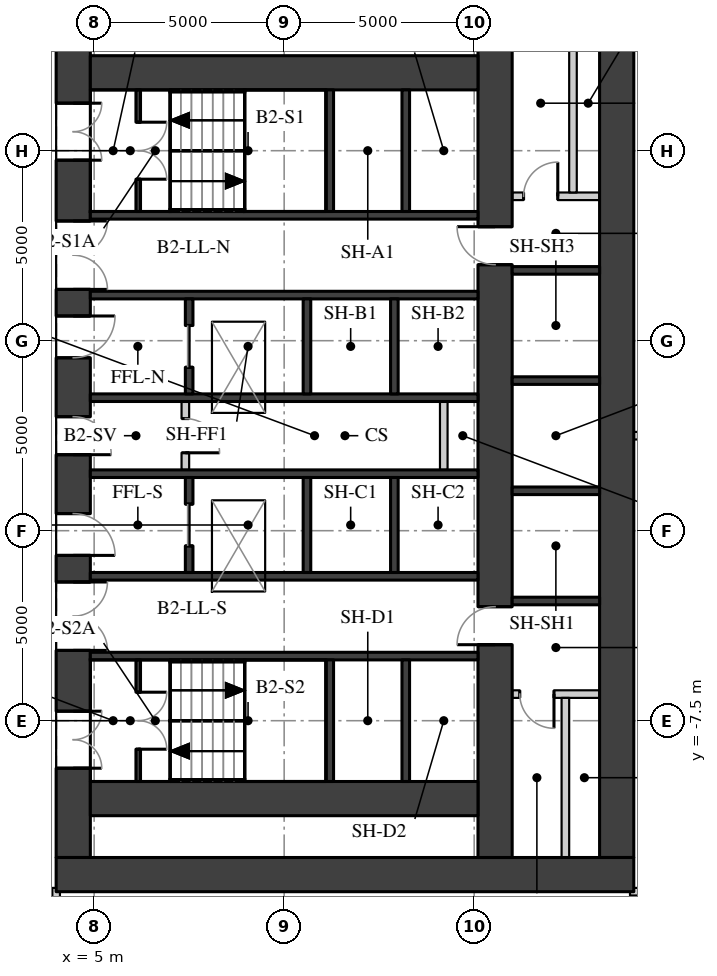
"""IFC4 building model, lengths in metres.
Left out: names, types, materials, properties, quantities, classifications, styles, units other than length and angle.
Written with IfcOpenShell. Run it as: python <this file> out.ifc"""

import sys

from ifc_helpers import new_model, si_unit, direction, frame, frame_2d, origin, place, context, subcontext, project, spatial, rectangle, extrude, element, fill, save


model = new_model("IFC4")
c1 = context("Model", 3, precision=1e-05, world=origin(), true_north=direction((0.0, 1.0)))
c2 = subcontext(c1, "Body", "Model", "MODEL_VIEW")
j1 = project(units=[si_unit("LENGTHUNIT", "METRE"), si_unit("PLANEANGLEUNIT", "RADIAN")], contexts=[c1])
p1 = place(None, origin())
s1 = spatial("IfcSite", under=j1, at=p1, CompositionType="ELEMENT")
p2 = place(p1, origin())
s2 = spatial("IfcBuilding", under=s1, at=p2, CompositionType="ELEMENT")
p3 = place(p2, frame((0.0, 0.0, -10.4)))
s3 = spatial("IfcBuildingStorey", under=s2, at=p3, CompositionType="ELEMENT", Elevation=-10.4)
p4 = place(p3, frame((4.45, -11.1, 0.0), z_axis=(0.0, 0.0, 1.0), x_axis=(0.0, 1.0, 0.0)))
e1 = element("IfcWall", 1, at=p4, inside=s3, PredefinedType="SHEAR", context=c2, shape_type="SweptSolid", body=[
    extrude(rectangle(XDim=22.2, YDim=0.9, at=frame_2d((11.1, 0.0))), origin(), (0.0, 0.0, 1.0), 4.75),
])
p5 = place(p4, frame((2.35, 0.0, 0.0)))
e2 = element("IfcOpeningElement", 2, at=p5, cuts=e1, PredefinedType="OPENING", context=c2, shape_type="SweptSolid", body=[
    extrude(rectangle(XDim=1.5, YDim=2.1, at=frame_2d((0.75, 1.05))), frame((0.0, 0.46, 0.0), z_axis=(0.0, -1.0, 0.0), x_axis=(1.0, 0.0, 0.0)), (0.0, 0.0, 1.0), 0.92),
])
p6 = place(p4, frame((5.45, 0.0, 0.0)))
e3 = element("IfcOpeningElement", 3, at=p6, cuts=e1, PredefinedType="OPENING", context=c2, shape_type="SweptSolid", body=[
    extrude(rectangle(XDim=1.8, YDim=2.1, at=frame_2d((0.9, 1.05))), frame((0.0, 0.46, 0.0), z_axis=(0.0, -1.0, 0.0), x_axis=(1.0, 0.0, 0.0)), (0.0, 0.0, 1.0), 0.92),
])
p7 = place(p4, frame((7.95, 0.0, 0.0)))
e4 = element("IfcOpeningElement", 4, at=p7, cuts=e1, PredefinedType="OPENING", context=c2, shape_type="SweptSolid", body=[
    extrude(rectangle(XDim=1.1, YDim=2.1, at=frame_2d((0.55, 1.05))), frame((0.0, 0.46, 0.0), z_axis=(0.0, -1.0, 0.0), x_axis=(1.0, 0.0, 0.0)), (0.0, 0.0, 1.0), 0.92),
])
p8 = place(p4, frame((10.6, 0.0, 0.0)))
e5 = element("IfcOpeningElement", 5, at=p8, cuts=e1, PredefinedType="OPENING", context=c2, shape_type="SweptSolid", body=[
    extrude(rectangle(XDim=1.0, YDim=2.1, at=frame_2d((0.5, 1.05))), frame((0.0, 0.46, 0.0), z_axis=(0.0, -1.0, 0.0), x_axis=(1.0, 0.0, 0.0)), (0.0, 0.0, 1.0), 0.92),
])
p9 = place(p4, frame((13.15, 0.0, 0.0)))
e6 = element("IfcOpeningElement", 6, at=p9, cuts=e1, PredefinedType="OPENING", context=c2, shape_type="SweptSolid", body=[
    extrude(rectangle(XDim=1.1, YDim=2.1, at=frame_2d((0.55, 1.05))), frame((0.0, 0.46, 0.0), z_axis=(0.0, -1.0, 0.0), x_axis=(1.0, 0.0, 0.0)), (0.0, 0.0, 1.0), 0.92),
])
p10 = place(p4, frame((14.95, 0.0, 0.0)))
e7 = element("IfcOpeningElement", 7, at=p10, cuts=e1, PredefinedType="OPENING", context=c2, shape_type="SweptSolid", body=[
    extrude(rectangle(XDim=1.8, YDim=2.1, at=frame_2d((0.9, 1.05))), frame((0.0, 0.46, 0.0), z_axis=(0.0, -1.0, 0.0), x_axis=(1.0, 0.0, 0.0)), (0.0, 0.0, 1.0), 0.92),
])
p11 = place(p4, frame((18.35, 0.0, 0.0)))
e8 = element("IfcOpeningElement", 8, at=p11, cuts=e1, PredefinedType="OPENING", context=c2, shape_type="SweptSolid", body=[
    extrude(rectangle(XDim=1.5, YDim=2.1, at=frame_2d((0.75, 1.05))), frame((0.0, 0.46, 0.0), z_axis=(0.0, -1.0, 0.0), x_axis=(1.0, 0.0, 0.0)), (0.0, 0.0, 1.0), 0.92),
])
p12 = place(p3, frame((18.75, -11.1, 0.0), z_axis=(0.0, 0.0, 1.0), x_axis=(0.0, 1.0, 0.0)))
e9 = element("IfcWall", 9, at=p12, inside=s3, PredefinedType="SHEAR", context=c2, shape_type="SweptSolid", body=[
    extrude(rectangle(XDim=22.2, YDim=0.9, at=frame_2d((11.1, 0.0))), origin(), (0.0, 0.0, 1.0), 4.75),
])
p13 = place(p3, frame((4.0, -11.55, 0.0), z_axis=(0.0, 0.0, 1.0), x_axis=(1.0, 0.0, 0.0)))
e10 = element("IfcWall", 10, at=p13, inside=s3, PredefinedType="SHEAR", context=c2, shape_type="SweptSolid", body=[
    extrude(rectangle(XDim=15.2, YDim=0.9, at=frame_2d((7.6, 0.0))), origin(), (0.0, 0.0, 1.0), 4.75),
])
p14 = place(p3, frame((15.55, -11.1, 0.0), z_axis=(0.0, 0.0, 1.0), x_axis=(0.0, 1.0, 0.0)))
e11 = element("IfcWall", 11, at=p14, inside=s3, PredefinedType="SHEAR", context=c2, shape_type="SweptSolid", body=[
    extrude(rectangle(XDim=22.2, YDim=0.9, at=frame_2d((11.1, 0.0))), origin(), (0.0, 0.0, 1.0), 4.75),
])
p15 = place(p14, frame((15.6, 0.0, 0.0)))
e12 = element("IfcOpeningElement", 12, at=p15, cuts=e11, PredefinedType="OPENING", context=c2, shape_type="SweptSolid", body=[
    extrude(rectangle(XDim=1.0, YDim=2.1, at=frame_2d((0.5, 1.05))), frame((0.0, 0.46, 0.0), z_axis=(0.0, -1.0, 0.0), x_axis=(1.0, 0.0, 0.0)), (0.0, 0.0, 1.0), 0.92),
])
p16 = place(p14, frame((5.6, 0.0, 0.0)))
e13 = element("IfcOpeningElement", 13, at=p16, cuts=e11, PredefinedType="OPENING", context=c2, shape_type="SweptSolid", body=[
    extrude(rectangle(XDim=1.0, YDim=2.1, at=frame_2d((0.5, 1.05))), frame((0.0, 0.46, 0.0), z_axis=(0.0, -1.0, 0.0), x_axis=(1.0, 0.0, 0.0)), (0.0, 0.0, 1.0), 0.92),
])
for number, where, z_axis, x_axis in (
    (14, (4.9, 9.55, 0.0), (0.0, 0.0, 1.0), (1.0, 0.0, 0.0)),
    (15, (4.9, -9.55, 0.0), (0.0, 0.0, 1.0), (1.0, 0.0, 0.0)),
):
    element("IfcWall", number, at=place(p3, frame(where, z_axis=z_axis, x_axis=x_axis)), inside=s3, PredefinedType="SHEAR", context=c2, shape_type="SweptSolid", body=[
        extrude(rectangle(XDim=10.2, YDim=0.9, at=frame_2d((5.1, 0.0))), origin(), (0.0, 0.0, 1.0), 4.75),
    ])
for number, where, z_axis, x_axis in (
    (16, (4.9, 5.8, 0.0), (0.0, 0.0, 1.0), (1.0, 0.0, 0.0)),
    (17, (4.9, 3.7, 0.0), (0.0, 0.0, 1.0), (1.0, 0.0, 0.0)),
    (18, (4.9, 1.0, 0.0), (0.0, 0.0, 1.0), (1.0, 0.0, 0.0)),
    (19, (4.9, -1.0, 0.0), (0.0, 0.0, 1.0), (1.0, 0.0, 0.0)),
    (20, (4.9, -3.7, 0.0), (0.0, 0.0, 1.0), (1.0, 0.0, 0.0)),
    (21, (4.9, -5.8, 0.0), (0.0, 0.0, 1.0), (1.0, 0.0, 0.0)),
):
    element("IfcWall", number, at=place(p3, frame(where, z_axis=z_axis, x_axis=x_axis)), inside=s3, PredefinedType="SHEAR", context=c2, shape_type="SweptSolid", body=[
        extrude(rectangle(XDim=10.2, YDim=0.2, at=frame_2d((5.1, 0.0))), origin(), (0.0, 0.0, 1.0), 4.75),
    ])
for number, where, z_axis, x_axis in (
    (22, (11.2, 5.9, 0.0), (0.0, 0.0, 1.0), (0.0, 1.0, 0.0)),
    (23, (11.2, -9.1, 0.0), (0.0, 0.0, 1.0), (0.0, 1.0, 0.0)),
    (24, (13.2, 5.9, 0.0), (0.0, 0.0, 1.0), (0.0, 1.0, 0.0)),
    (25, (13.2, -9.1, 0.0), (0.0, 0.0, 1.0), (0.0, 1.0, 0.0)),
):
    element("IfcWall", number, at=place(p3, frame(where, z_axis=z_axis, x_axis=x_axis)), inside=s3, PredefinedType="SHEAR", context=c2, shape_type="SweptSolid", body=[
        extrude(rectangle(XDim=3.2, YDim=0.2, at=frame_2d((1.6, 0.0))), origin(), (0.0, 0.0, 1.0), 4.75),
    ])
p17 = place(p3, frame((7.5, 1.1, 0.0), z_axis=(0.0, 0.0, 1.0), x_axis=(0.0, 1.0, 0.0)))
e26 = element("IfcWall", 26, at=p17, inside=s3, PredefinedType="SHEAR", context=c2, shape_type="SweptSolid", body=[
    extrude(rectangle(XDim=2.5, YDim=0.2, at=frame_2d((1.25, 0.0))), origin(), (0.0, 0.0, 1.0), 4.75),
])
p18 = place(p17, frame((0.7, 0.0, 0.0)))
e27 = element("IfcOpeningElement", 27, at=p18, cuts=e26, PredefinedType="OPENING", context=c2, shape_type="SweptSolid", body=[
    extrude(rectangle(XDim=1.1, YDim=2.1, at=frame_2d((0.55, 1.05))), frame((0.0, 0.11, 0.0), z_axis=(0.0, -1.0, 0.0), x_axis=(1.0, 0.0, 0.0)), (0.0, 0.0, 1.0), 0.22),
])
p19 = place(p3, frame((7.5, -3.6, 0.0), z_axis=(0.0, 0.0, 1.0), x_axis=(0.0, 1.0, 0.0)))
e28 = element("IfcWall", 28, at=p19, inside=s3, PredefinedType="SHEAR", context=c2, shape_type="SweptSolid", body=[
    extrude(rectangle(XDim=2.5, YDim=0.2, at=frame_2d((1.25, 0.0))), origin(), (0.0, 0.0, 1.0), 4.75),
])
p20 = place(p19, frame((0.7, 0.0, 0.0)))
e29 = element("IfcOpeningElement", 29, at=p20, cuts=e28, PredefinedType="OPENING", context=c2, shape_type="SweptSolid", body=[
    extrude(rectangle(XDim=1.1, YDim=2.1, at=frame_2d((0.55, 1.05))), frame((0.0, 0.11, 0.0), z_axis=(0.0, -1.0, 0.0), x_axis=(1.0, 0.0, 0.0)), (0.0, 0.0, 1.0), 0.22),
])
for number, where, z_axis, x_axis in (
    (30, (10.6, 1.1, 0.0), (0.0, 0.0, 1.0), (0.0, 1.0, 0.0)),
    (31, (10.6, -3.6, 0.0), (0.0, 0.0, 1.0), (0.0, 1.0, 0.0)),
    (32, (12.9, 1.1, 0.0), (0.0, 0.0, 1.0), (0.0, 1.0, 0.0)),
    (33, (12.9, -3.6, 0.0), (0.0, 0.0, 1.0), (0.0, 1.0, 0.0)),
):
    element("IfcWall", number, at=place(p3, frame(where, z_axis=z_axis, x_axis=x_axis)), inside=s3, PredefinedType="SHEAR", context=c2, shape_type="SweptSolid", body=[
        extrude(rectangle(XDim=2.5, YDim=0.2, at=frame_2d((1.25, 0.0))), origin(), (0.0, 0.0, 1.0), 4.75),
    ])
p21 = place(p3, frame((6.16, 5.9, 0.0), z_axis=(0.0, 0.0, 1.0), x_axis=(0.0, 1.0, 0.0)))
e34 = element("IfcWall", 34, at=p21, inside=s3, PredefinedType="SHEAR", context=c2, shape_type="SweptSolid", body=[
    extrude(rectangle(XDim=3.2, YDim=0.12, at=frame_2d((1.6, 0.0))), origin(), (0.0, 0.0, 1.0), 2.39),
])
p22 = place(p21, frame((0.85, 0.0, 0.0)))
e35 = element("IfcOpeningElement", 35, at=p22, cuts=e34, PredefinedType="OPENING", context=c2, shape_type="SweptSolid", body=[
    extrude(rectangle(XDim=1.5, YDim=2.1, at=frame_2d((0.75, 1.05))), frame((0.0, 0.07, 0.0), z_axis=(0.0, -1.0, 0.0), x_axis=(1.0, 0.0, 0.0)), (0.0, 0.0, 1.0), 0.14),
])
p23 = place(p3, frame((6.16, -9.1, 0.0), z_axis=(0.0, 0.0, 1.0), x_axis=(0.0, 1.0, 0.0)))
e36 = element("IfcWall", 36, at=p23, inside=s3, PredefinedType="SHEAR", context=c2, shape_type="SweptSolid", body=[
    extrude(rectangle(XDim=3.2, YDim=0.12, at=frame_2d((1.6, 0.0))), origin(), (0.0, 0.0, 1.0), 2.39),
])
p24 = place(p23, frame((0.85, 0.0, 0.0)))
e37 = element("IfcOpeningElement", 37, at=p24, cuts=e36, PredefinedType="OPENING", context=c2, shape_type="SweptSolid", body=[
    extrude(rectangle(XDim=1.5, YDim=2.1, at=frame_2d((0.75, 1.05))), frame((0.0, 0.07, 0.0), z_axis=(0.0, -1.0, 0.0), x_axis=(1.0, 0.0, 0.0)), (0.0, 0.0, 1.0), 0.14),
])
p25 = place(p3, frame((7.4, -0.9, 0.0), z_axis=(0.0, 0.0, 1.0), x_axis=(0.0, 1.0, 0.0)))
e38 = element("IfcWall", 38, at=p25, inside=s3, PredefinedType="PARTITIONING", context=c2, shape_type="SweptSolid", body=[
    extrude(rectangle(XDim=1.8, YDim=0.2, at=frame_2d((0.9, 0.0))), origin(), (0.0, 0.0, 1.0), 4.75),
])
p26 = place(p25, frame((0.45, 0.0, 0.0)))
e39 = element("IfcOpeningElement", 39, at=p26, cuts=e38, PredefinedType="OPENING", context=c2, shape_type="SweptSolid", body=[
    extrude(rectangle(XDim=0.9, YDim=2.1, at=frame_2d((0.45, 1.05))), frame((0.0, 0.11, 0.0), z_axis=(0.0, -1.0, 0.0), x_axis=(1.0, 0.0, 0.0)), (0.0, 0.0, 1.0), 0.22),
])
p27 = place(p3, frame((14.2, -0.9, 0.0), z_axis=(0.0, 0.0, 1.0), x_axis=(0.0, 1.0, 0.0)))
e40 = element("IfcWall", 40, at=p27, inside=s3, PredefinedType="PARTITIONING", context=c2, shape_type="SweptSolid", body=[
    extrude(rectangle(XDim=1.8, YDim=0.2, at=frame_2d((0.9, 0.0))), origin(), (0.0, 0.0, 1.0), 4.75),
])
for number, where, z_axis, x_axis in (
    (41, (16.0, -4.35, 0.0), (0.0, 0.0, 1.0), (1.0, 0.0, 0.0)),
    (42, (16.0, -1.45, 0.0), (0.0, 0.0, 1.0), (1.0, 0.0, 0.0)),
    (43, (16.0, 1.45, 0.0), (0.0, 0.0, 1.0), (1.0, 0.0, 0.0)),
    (44, (16.0, 4.35, 0.0), (0.0, 0.0, 1.0), (1.0, 0.0, 0.0)),
):
    element("IfcWall", number, at=place(p3, frame(where, z_axis=z_axis, x_axis=x_axis)), inside=s3, PredefinedType="SHEAR", context=c2, shape_type="SweptSolid", body=[
        extrude(rectangle(XDim=2.3, YDim=0.2, at=frame_2d((1.15, 0.0))), origin(), (0.0, 0.0, 1.0), 4.75),
    ])
p28 = place(p3, frame((16.0, 6.3, 0.0), z_axis=(0.0, 0.0, 1.0), x_axis=(1.0, 0.0, 0.0)))
e45 = element("IfcWall", 45, at=p28, inside=s3, PredefinedType="PARTITIONING", context=c2, shape_type="SweptSolid", body=[
    extrude(rectangle(XDim=2.3, YDim=0.2, at=frame_2d((1.15, 0.0))), origin(), (0.0, 0.0, 1.0), 4.75),
])
p29 = place(p28, frame((0.3, 0.0, 0.0)))
e46 = element("IfcOpeningElement", 46, at=p29, cuts=e45, PredefinedType="OPENING", context=c2, shape_type="SweptSolid", body=[
    extrude(rectangle(XDim=0.9, YDim=2.1, at=frame_2d((0.45, 1.05))), frame((0.0, 0.11, 0.0), z_axis=(0.0, -1.0, 0.0), x_axis=(1.0, 0.0, 0.0)), (0.0, 0.0, 1.0), 0.22),
])
p30 = place(p3, frame((17.6, 6.4, 0.0), z_axis=(0.0, 0.0, 1.0), x_axis=(0.0, 1.0, 0.0)))
e47 = element("IfcWall", 47, at=p30, inside=s3, PredefinedType="PARTITIONING", context=c2, shape_type="SweptSolid", body=[
    extrude(rectangle(XDim=4.7, YDim=0.2, at=frame_2d((2.35, 0.0))), origin(), (0.0, 0.0, 1.0), 4.75),
])
p31 = place(p3, frame((16.0, -6.8, 0.0), z_axis=(0.0, 0.0, 1.0), x_axis=(1.0, 0.0, 0.0)))
e48 = element("IfcWall", 48, at=p31, inside=s3, PredefinedType="PARTITIONING", context=c2, shape_type="SweptSolid", body=[
    extrude(rectangle(XDim=2.3, YDim=0.2, at=frame_2d((1.15, 0.0))), origin(), (0.0, 0.0, 1.0), 4.75),
])
p32 = place(p31, frame((0.2, 0.0, 0.0)))
e49 = element("IfcOpeningElement", 49, at=p32, cuts=e48, PredefinedType="OPENING", context=c2, shape_type="SweptSolid", body=[
    extrude(rectangle(XDim=0.9, YDim=2.1, at=frame_2d((0.45, 1.05))), frame((0.0, 0.11, 0.0), z_axis=(0.0, -1.0, 0.0), x_axis=(1.0, 0.0, 0.0)), (0.0, 0.0, 1.0), 0.22),
])
p33 = place(p3, frame((17.4, -11.1, 0.0), z_axis=(0.0, 0.0, 1.0), x_axis=(0.0, 1.0, 0.0)))
e50 = element("IfcWall", 50, at=p33, inside=s3, PredefinedType="PARTITIONING", context=c2, shape_type="SweptSolid", body=[
    extrude(rectangle(XDim=4.2, YDim=0.2, at=frame_2d((2.1, 0.0))), origin(), (0.0, 0.0, 1.0), 4.75),
])
p34 = place(p3, frame((19.1, -12.0, 0.0), z_axis=(0.0, 0.0, 1.0), x_axis=(1.0, 0.0, 0.0)))
e51 = element("IfcWall", 51, at=p34, inside=s3, PredefinedType="PARTITIONING", context=c2, shape_type="SweptSolid", body=[
    extrude(rectangle(XDim=20.625, YDim=0.2, at=frame_2d((10.312, 0.0))), origin(), (0.0, 0.0, 1.0), 3.85),
])
p35 = place(p34, frame((9.813, 0.0, 0.0)))
e52 = element("IfcOpeningElement", 52, at=p35, cuts=e51, PredefinedType="OPENING", context=c2, shape_type="SweptSolid", body=[
    extrude(rectangle(XDim=1.0, YDim=2.1, at=frame_2d((0.5, 1.05))), frame((0.0, 0.11, 0.0), z_axis=(0.0, -1.0, 0.0), x_axis=(1.0, 0.0, 0.0)), (0.0, 0.0, 1.0), 0.22),
])
p36 = place(p3, frame((19.198, 0.0, 0.0), z_axis=(0.0, 0.0, 1.0), x_axis=(1.0, 0.0, 0.0)))
e53 = element("IfcWall", 53, at=p36, inside=s3, PredefinedType="PARTITIONING", context=c2, shape_type="SweptSolid", body=[
    extrude(rectangle(XDim=23.546, YDim=0.2, at=frame_2d((11.773, 0.0))), origin(), (0.0, 0.0, 1.0), 3.75),
])
p37 = place(p3, frame((4.0, -14.9, 0.0), z_axis=(0.0, 0.0, 1.0), x_axis=(0.0, 1.0, 0.0)))
e54 = element("IfcWall", 54, at=p37, inside=s3, PredefinedType="PARTITIONING", context=c2, shape_type="SweptSolid", body=[
    extrude(rectangle(XDim=3.0, YDim=0.2, at=frame_2d((1.5, 0.0))), origin(), (0.0, 0.0, 1.0), 4.75),
])
p38 = place(p37, frame((0.9, 0.0, 0.0)))
e55 = element("IfcOpeningElement", 55, at=p38, cuts=e54, PredefinedType="OPENING", context=c2, shape_type="SweptSolid", body=[
    extrude(rectangle(XDim=1.0, YDim=2.1, at=frame_2d((0.5, 1.05))), frame((0.0, 0.11, 0.0), z_axis=(0.0, -1.0, 0.0), x_axis=(1.0, 0.0, 0.0)), (0.0, 0.0, 1.0), 0.22),
])
p39 = place(p5, origin())
e56 = element("IfcDoor", 56, at=p39, inside=s3, OperationType="DOUBLE_DOOR_SINGLE_SWING", PredefinedType="DOOR", context=c2, shape_type="SweptSolid", body=[
    extrude(rectangle(XDim=1.5, YDim=2.1, at=frame_2d((0.75, 1.05))), frame((0.0, 0.025, 0.0), z_axis=(0.0, -1.0, 0.0), x_axis=(1.0, 0.0, 0.0)), (0.0, 0.0, 1.0), 0.05),
])
fill(e2, e56)
p40 = place(p6, origin())
e57 = element("IfcDoor", 57, at=p40, inside=s3, OperationType="DOUBLE_DOOR_SINGLE_SWING", PredefinedType="DOOR", context=c2, shape_type="SweptSolid", body=[
    extrude(rectangle(XDim=1.8, YDim=2.1, at=frame_2d((0.9, 1.05))), frame((0.0, 0.025, 0.0), z_axis=(0.0, -1.0, 0.0), x_axis=(1.0, 0.0, 0.0)), (0.0, 0.0, 1.0), 0.05),
])
fill(e3, e57)
p41 = place(p7, origin())
e58 = element("IfcDoor", 58, at=p41, inside=s3, OperationType="SINGLE_SWING_RIGHT", PredefinedType="DOOR", context=c2, shape_type="SweptSolid", body=[
    extrude(rectangle(XDim=1.1, YDim=2.1, at=frame_2d((0.55, 1.05))), frame((0.0, 0.025, 0.0), z_axis=(0.0, -1.0, 0.0), x_axis=(1.0, 0.0, 0.0)), (0.0, 0.0, 1.0), 0.05),
])
fill(e4, e58)
p42 = place(p8, origin())
e59 = element("IfcDoor", 59, at=p42, inside=s3, OperationType="SINGLE_SWING_RIGHT", PredefinedType="DOOR", context=c2, shape_type="SweptSolid", body=[
    extrude(rectangle(XDim=1.0, YDim=2.1, at=frame_2d((0.5, 1.05))), frame((0.0, 0.025, 0.0), z_axis=(0.0, -1.0, 0.0), x_axis=(1.0, 0.0, 0.0)), (0.0, 0.0, 1.0), 0.05),
])
fill(e5, e59)
p43 = place(p9, origin())
e60 = element("IfcDoor", 60, at=p43, inside=s3, OperationType="SINGLE_SWING_LEFT", PredefinedType="DOOR", context=c2, shape_type="SweptSolid", body=[
    extrude(rectangle(XDim=1.1, YDim=2.1, at=frame_2d((0.55, 1.05))), frame((0.0, 0.025, 0.0), z_axis=(0.0, -1.0, 0.0), x_axis=(1.0, 0.0, 0.0)), (0.0, 0.0, 1.0), 0.05),
])
fill(e6, e60)
p44 = place(p10, origin())
e61 = element("IfcDoor", 61, at=p44, inside=s3, OperationType="DOUBLE_DOOR_SINGLE_SWING", PredefinedType="DOOR", context=c2, shape_type="SweptSolid", body=[
    extrude(rectangle(XDim=1.8, YDim=2.1, at=frame_2d((0.9, 1.05))), frame((0.0, 0.025, 0.0), z_axis=(0.0, -1.0, 0.0), x_axis=(1.0, 0.0, 0.0)), (0.0, 0.0, 1.0), 0.05),
])
fill(e7, e61)
p45 = place(p11, origin())
e62 = element("IfcDoor", 62, at=p45, inside=s3, OperationType="DOUBLE_DOOR_SINGLE_SWING", PredefinedType="DOOR", context=c2, shape_type="SweptSolid", body=[
    extrude(rectangle(XDim=1.5, YDim=2.1, at=frame_2d((0.75, 1.05))), frame((0.0, 0.025, 0.0), z_axis=(0.0, -1.0, 0.0), x_axis=(1.0, 0.0, 0.0)), (0.0, 0.0, 1.0), 0.05),
])
fill(e8, e62)
p46 = place(p22, origin())
e63 = element("IfcDoor", 63, at=p46, inside=s3, OperationType="DOUBLE_DOOR_SINGLE_SWING", PredefinedType="DOOR", context=c2, shape_type="SweptSolid", body=[
    extrude(rectangle(XDim=1.5, YDim=2.1, at=frame_2d((0.75, 1.05))), frame((0.0, 0.025, 0.0), z_axis=(0.0, -1.0, 0.0), x_axis=(1.0, 0.0, 0.0)), (0.0, 0.0, 1.0), 0.05),
])
fill(e35, e63)
p47 = place(p24, origin())
e64 = element("IfcDoor", 64, at=p47, inside=s3, OperationType="DOUBLE_DOOR_SINGLE_SWING", PredefinedType="DOOR", context=c2, shape_type="SweptSolid", body=[
    extrude(rectangle(XDim=1.5, YDim=2.1, at=frame_2d((0.75, 1.05))), frame((0.0, 0.025, 0.0), z_axis=(0.0, -1.0, 0.0), x_axis=(1.0, 0.0, 0.0)), (0.0, 0.0, 1.0), 0.05),
])
fill(e37, e64)
p48 = place(p18, origin())
e65 = element("IfcDoor", 65, at=p48, inside=s3, OperationType="DOUBLE_DOOR_SLIDING", PredefinedType="DOOR", context=c2, shape_type="SweptSolid", body=[
    extrude(rectangle(XDim=1.1, YDim=2.1, at=frame_2d((0.55, 1.05))), frame((0.0, 0.025, 0.0), z_axis=(0.0, -1.0, 0.0), x_axis=(1.0, 0.0, 0.0)), (0.0, 0.0, 1.0), 0.05),
])
fill(e27, e65)
p49 = place(p20, origin())
e66 = element("IfcDoor", 66, at=p49, inside=s3, OperationType="DOUBLE_DOOR_SLIDING", PredefinedType="DOOR", context=c2, shape_type="SweptSolid", body=[
    extrude(rectangle(XDim=1.1, YDim=2.1, at=frame_2d((0.55, 1.05))), frame((0.0, 0.025, 0.0), z_axis=(0.0, -1.0, 0.0), x_axis=(1.0, 0.0, 0.0)), (0.0, 0.0, 1.0), 0.05),
])
fill(e29, e66)
p50 = place(p26, origin())
e67 = element("IfcDoor", 67, at=p50, inside=s3, OperationType="SINGLE_SWING_RIGHT", PredefinedType="DOOR", context=c2, shape_type="SweptSolid", body=[
    extrude(rectangle(XDim=0.9, YDim=2.1, at=frame_2d((0.45, 1.05))), frame((0.0, 0.025, 0.0), z_axis=(0.0, -1.0, 0.0), x_axis=(1.0, 0.0, 0.0)), (0.0, 0.0, 1.0), 0.05),
])
fill(e39, e67)
p51 = place(p15, origin())
e68 = element("IfcDoor", 68, at=p51, inside=s3, OperationType="SINGLE_SWING_RIGHT", PredefinedType="DOOR", context=c2, shape_type="SweptSolid", body=[
    extrude(rectangle(XDim=1.0, YDim=2.1, at=frame_2d((0.5, 1.05))), frame((0.0, 0.025, 0.0), z_axis=(0.0, -1.0, 0.0), x_axis=(1.0, 0.0, 0.0)), (0.0, 0.0, 1.0), 0.05),
])
fill(e12, e68)
p52 = place(p29, origin())
e69 = element("IfcDoor", 69, at=p52, inside=s3, OperationType="SINGLE_SWING_RIGHT", PredefinedType="DOOR", context=c2, shape_type="SweptSolid", body=[
    extrude(rectangle(XDim=0.9, YDim=2.1, at=frame_2d((0.45, 1.05))), frame((0.0, 0.025, 0.0), z_axis=(0.0, -1.0, 0.0), x_axis=(1.0, 0.0, 0.0)), (0.0, 0.0, 1.0), 0.05),
])
fill(e46, e69)
p53 = place(p16, origin())
e70 = element("IfcDoor", 70, at=p53, inside=s3, OperationType="SINGLE_SWING_LEFT", PredefinedType="DOOR", context=c2, shape_type="SweptSolid", body=[
    extrude(rectangle(XDim=1.0, YDim=2.1, at=frame_2d((0.5, 1.05))), frame((0.0, 0.025, 0.0), z_axis=(0.0, -1.0, 0.0), x_axis=(1.0, 0.0, 0.0)), (0.0, 0.0, 1.0), 0.05),
])
fill(e13, e70)
p54 = place(p32, origin())
e71 = element("IfcDoor", 71, at=p54, inside=s3, OperationType="SINGLE_SWING_LEFT", PredefinedType="DOOR", context=c2, shape_type="SweptSolid", body=[
    extrude(rectangle(XDim=0.9, YDim=2.1, at=frame_2d((0.45, 1.05))), frame((0.0, 0.025, 0.0), z_axis=(0.0, -1.0, 0.0), x_axis=(1.0, 0.0, 0.0)), (0.0, 0.0, 1.0), 0.05),
])
fill(e49, e71)
save(model, sys.argv[1])
